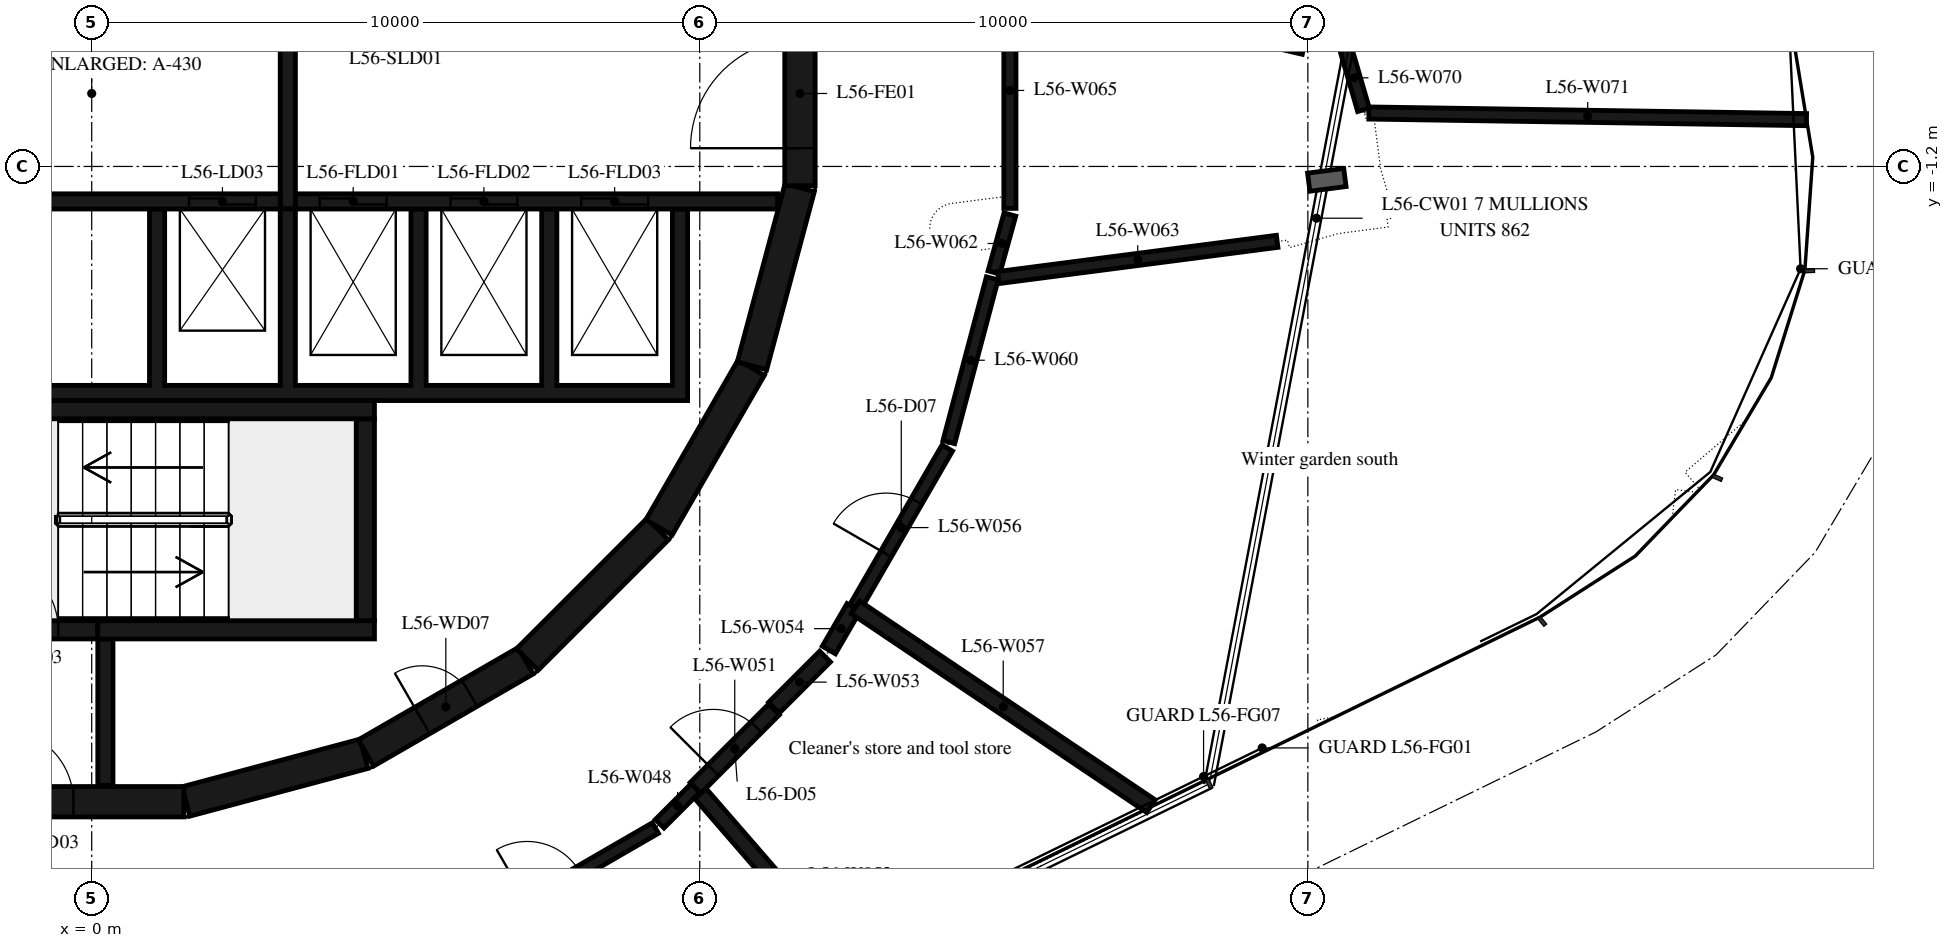
"""IFC4 building model, lengths in metres.
Left out: names, types, materials, properties, quantities, classifications, styles, units other than length and angle.
Written with IfcOpenShell. Run it as: python <this file> out.ifc"""

import sys

from ifc_helpers import new_model, si_unit, direction, frame, frame_2d, origin, place, context, subcontext, project, spatial, polyline, rectangle, outline, extrude, element, fill, save


model = new_model("IFC4")
c1 = context("Model", 3, precision=1e-05, world=origin(), true_north=direction((0.0, 1.0)))
c2 = subcontext(c1, "Body", "Model", "MODEL_VIEW")
j1 = project(units=[si_unit("LENGTHUNIT", "METRE"), si_unit("PLANEANGLEUNIT", "RADIAN")], contexts=[c1])
p1 = place(None, origin())
s1 = spatial("IfcSite", under=j1, at=p1, CompositionType="ELEMENT")
p2 = place(p1, origin())
s2 = spatial("IfcBuilding", under=s1, at=p2, CompositionType="ELEMENT")
p3 = place(p2, frame((0.0, 0.0, 219.9)))
s3 = spatial("IfcBuildingStorey", under=s2, at=p3, CompositionType="ELEMENT", Elevation=219.9)
p4 = place(p3, frame((1.55, -11.643, 0.0), z_axis=(0.0, 0.0, 1.0), x_axis=(0.965948410781, 0.258734743916, 0.0)))
e1 = element("IfcWall", 1, at=p4, inside=s3, PredefinedType="SHEAR", context=c2, shape_type="SweptSolid", body=[
    extrude(rectangle(XDim=3.033, YDim=0.5, at=frame_2d((1.516, 0.0))), origin(), (0.0, 0.0, 1.0), 6.35),
])
p5 = place(p3, frame((4.51, -10.845, 0.0), z_axis=(0.0, 0.0, 1.0), x_axis=(0.865975092491, 0.500087131594, 0.0)))
e2 = element("IfcWall", 2, at=p5, inside=s3, PredefinedType="SHEAR", context=c2, shape_type="SweptSolid", body=[
    extrude(rectangle(XDim=3.033, YDim=0.5, at=frame_2d((1.516, 0.0))), origin(), (0.0, 0.0, 1.0), 6.35),
])
p6 = place(p5, frame((1.066, 0.0, 0.0)))
e3 = element("IfcOpeningElement", 3, at=p6, cuts=e2, PredefinedType="OPENING", context=c2, shape_type="SweptSolid", body=[
    extrude(rectangle(XDim=0.9, YDim=2.1, at=frame_2d((0.45, 1.05))), frame((0.0, 0.26, 0.0), z_axis=(0.0, -1.0, 0.0), x_axis=(1.0, 0.0, 0.0)), (0.0, 0.0, 1.0), 0.52),
])
p7 = place(p3, frame((7.164, -9.308, 0.0), z_axis=(0.0, 0.0, 1.0), x_axis=(0.707106781187, 0.707106781187, 0.0)))
e4 = element("IfcWall", 4, at=p7, inside=s3, PredefinedType="SHEAR", context=c2, shape_type="SweptSolid", body=[
    extrude(rectangle(XDim=3.032, YDim=0.5, at=frame_2d((1.516, 0.0))), origin(), (0.0, 0.0, 1.0), 6.35),
])
for number, where, z_axis, x_axis in (
    (5, (9.329, -7.137, 0.0), (0.0, 0.0, 1.0), (0.5, 0.866, 0.0)),
    (6, (10.858, -4.479, 0.0), (0.0, 0.0, 1.0), (0.259, 0.966, 0.0)),
):
    element("IfcWall", number, at=place(p3, frame(where, z_axis=z_axis, x_axis=x_axis)), inside=s3, PredefinedType="SHEAR", context=c2, shape_type="SweptSolid", body=[
        extrude(rectangle(XDim=3.033, YDim=0.5, at=frame_2d((1.516, 0.0))), origin(), (0.0, 0.0, 1.0), 6.35),
    ])
p8 = place(p3, frame((11.647, -1.516, 0.0), z_axis=(0.0, 0.0, 1.0), x_axis=(0.0, 1.0, 0.0)))
e7 = element("IfcWall", 7, at=p8, inside=s3, PredefinedType="SHEAR", context=c2, shape_type="SweptSolid", body=[
    extrude(rectangle(XDim=3.033, YDim=0.5, at=frame_2d((1.516, 0.0))), origin(), (0.0, 0.0, 1.0), 6.35),
])
p9 = place(p8, frame((0.616, 0.0, 0.0)))
e8 = element("IfcOpeningElement", 8, at=p9, cuts=e7, PredefinedType="OPENING", context=c2, shape_type="SweptSolid", body=[
    extrude(rectangle(XDim=1.8, YDim=2.1, at=frame_2d((0.9, 1.05))), frame((0.0, 0.26, 0.0), z_axis=(0.0, -1.0, 0.0), x_axis=(1.0, 0.0, 0.0)), (0.0, 0.0, 1.0), 0.52),
])
p10 = place(p3, frame((-1.516, -11.647, 0.0), z_axis=(0.0, 0.0, 1.0), x_axis=(1.0, 0.0, 0.0)))
e9 = element("IfcWall", 9, at=p10, inside=s3, PredefinedType="SHEAR", context=c2, shape_type="SweptSolid", body=[
    extrude(rectangle(XDim=3.033, YDim=0.5, at=frame_2d((1.516, 0.0))), origin(), (0.0, 0.0, 1.0), 6.35),
])
p11 = place(p10, frame((0.016, 0.0, 0.0)))
e10 = element("IfcOpeningElement", 10, at=p11, cuts=e9, PredefinedType="OPENING", context=c2, shape_type="SweptSolid", body=[
    extrude(rectangle(XDim=1.2, YDim=2.1, at=frame_2d((0.6, 1.05))), frame((0.0, 0.26, 0.0), z_axis=(0.0, -1.0, 0.0), x_axis=(1.0, 0.0, 0.0)), (0.0, 0.0, 1.0), 0.52),
])
p12 = place(p3, frame((-2.4, -5.2, 0.0), z_axis=(0.0, 0.0, 1.0), x_axis=(1.0, 0.0, 0.0)))
e11 = element("IfcWall", 11, at=p12, inside=s3, PredefinedType="SHEAR", context=c2, shape_type="SweptSolid", body=[
    extrude(rectangle(XDim=7.05, YDim=0.3, at=frame_2d((3.525, 0.0))), origin(), (0.0, 0.0, 1.0), 6.35),
])
p13 = place(p3, frame((4.5, -8.67, 0.0), z_axis=(0.0, 0.0, 1.0), x_axis=(0.0, 1.0, 0.0)))
e12 = element("IfcWall", 12, at=p13, inside=s3, PredefinedType="SHEAR", context=c2, shape_type="SweptSolid", body=[
    extrude(rectangle(XDim=3.32, YDim=0.3, at=frame_2d((1.66, 0.0))), origin(), (0.0, 0.0, 1.0), 6.35),
])
p14 = place(p3, frame((0.1, -8.82, 0.0), z_axis=(0.0, 0.0, 1.0), x_axis=(1.0, 0.0, 0.0)))
e13 = element("IfcWall", 13, at=p14, inside=s3, PredefinedType="SHEAR", context=c2, shape_type="SweptSolid", body=[
    extrude(rectangle(XDim=4.55, YDim=0.3, at=frame_2d((2.275, 0.0))), origin(), (0.0, 0.0, 1.0), 6.35),
])
p15 = place(p3, frame((-2.4, -8.82, 0.0), z_axis=(0.0, 0.0, 1.0), x_axis=(1.0, 0.0, 0.0)))
e14 = element("IfcWall", 14, at=p15, inside=s3, PredefinedType="SHEAR", context=c2, shape_type="SweptSolid", body=[
    extrude(rectangle(XDim=2.5, YDim=0.3, at=frame_2d((1.25, 0.0))), origin(), (0.0, 0.0, 1.0), 6.35),
])
p16 = place(p15, frame((0.65, 0.0, 0.0)))
e15 = element("IfcOpeningElement", 15, at=p16, cuts=e14, PredefinedType="OPENING", context=c2, shape_type="SweptSolid", body=[
    extrude(rectangle(XDim=1.2, YDim=2.1, at=frame_2d((0.6, 1.05))), frame((0.0, 0.16, 0.0), z_axis=(0.0, -1.0, 0.0), x_axis=(1.0, 0.0, 0.0)), (0.0, 0.0, 1.0), 0.32),
])
p17 = place(p3, frame((0.225, -8.97, 0.0), z_axis=(0.0, 0.0, 1.0), x_axis=(0.0, -1.0, 0.0)))
e16 = element("IfcWall", 16, at=p17, inside=s3, PredefinedType="SHEAR", context=c2, shape_type="SweptSolid", body=[
    extrude(rectangle(XDim=2.41, YDim=0.25, at=frame_2d((1.205, 0.0))), origin(), (0.0, 0.0, 1.0), 6.35),
])
p18 = place(p3, origin())
e17 = element("IfcWall", 17, at=p18, inside=s3, PredefinedType="SHEAR", context=c2, shape_type="SweptSolid", body=[
    extrude(outline(polyline([(9.8, -5.05), (9.8, -4.8), (9.8, -1.9), (9.55, -1.9), (9.55, -4.8), (7.65, -4.8), (7.65, -1.9), (7.4, -1.9), (7.4, -4.8), (5.5, -4.8), (5.5, -1.9), (5.25, -1.9), (5.25, -4.8), (3.35, -4.8), (3.35, -1.9), (3.1, -1.9), (3.1, -4.8), (1.2, -4.8), (1.2, -1.9), (0.95, -1.9), (0.95, -4.8), (-5.25, -4.8), (-5.25, -1.9), (-5.5, -1.9), (-5.5, -4.8), (-7.4, -4.8), (-7.4, -1.9), (-7.65, -1.9), (-7.65, -4.8), (-9.55, -4.8), (-9.55, -1.9), (-9.8, -1.9), (-9.8, -4.8), (-9.8, -5.05), (9.8, -5.05)])), origin(), (0.0, 0.0, 1.0), 6.35),
])
p19 = place(p3, frame((-11.28, -1.775, 0.0), z_axis=(0.0, 0.0, 1.0), x_axis=(1.0, 0.0, 0.0)))
e18 = element("IfcWall", 18, at=p19, inside=s3, PredefinedType="SHEAR", context=c2, shape_type="SweptSolid", body=[
    extrude(rectangle(XDim=14.38, YDim=0.25, at=frame_2d((7.19, 0.0))), origin(), (0.0, 0.0, 1.0), 6.35),
])
p20 = place(p19, frame((12.88, 0.0, 0.0)))
e19 = element("IfcOpeningElement", 19, at=p20, cuts=e18, PredefinedType="OPENING", context=c2, shape_type="SweptSolid", body=[
    extrude(rectangle(XDim=1.1, YDim=2.1, at=frame_2d((0.55, 1.05))), frame((0.0, 0.135, 0.0), z_axis=(0.0, -1.0, 0.0), x_axis=(1.0, 0.0, 0.0)), (0.0, 0.0, 1.0), 0.27),
])
p21 = place(p19, frame((8.68, 0.0, 0.0)))
e20 = element("IfcOpeningElement", 20, at=p21, cuts=e18, PredefinedType="OPENING", context=c2, shape_type="SweptSolid", body=[
    extrude(rectangle(XDim=0.9, YDim=2.1, at=frame_2d((0.45, 1.05))), frame((0.0, 0.135, 0.0), z_axis=(0.0, -1.0, 0.0), x_axis=(1.0, 0.0, 0.0)), (0.0, 0.0, 1.0), 0.27),
])
p22 = place(p3, frame((3.35, -1.775, 0.0), z_axis=(0.0, 0.0, 1.0), x_axis=(1.0, 0.0, 0.0)))
e21 = element("IfcWall", 21, at=p22, inside=s3, PredefinedType="SHEAR", context=c2, shape_type="SweptSolid", body=[
    extrude(rectangle(XDim=7.93, YDim=0.25, at=frame_2d((3.965, 0.0))), origin(), (0.0, 0.0, 1.0), 6.35),
])
p23 = place(p22, frame((0.4, 0.0, 0.0)))
e22 = element("IfcOpeningElement", 22, at=p23, cuts=e21, PredefinedType="OPENING", context=c2, shape_type="SweptSolid", body=[
    extrude(rectangle(XDim=1.1, YDim=2.4, at=frame_2d((0.55, 1.2))), frame((0.0, 0.135, 0.0), z_axis=(0.0, -1.0, 0.0), x_axis=(1.0, 0.0, 0.0)), (0.0, 0.0, 1.0), 0.27),
])
p24 = place(p22, frame((2.55, 0.0, 0.0)))
e23 = element("IfcOpeningElement", 23, at=p24, cuts=e21, PredefinedType="OPENING", context=c2, shape_type="SweptSolid", body=[
    extrude(rectangle(XDim=1.1, YDim=2.4, at=frame_2d((0.55, 1.2))), frame((0.0, 0.135, 0.0), z_axis=(0.0, -1.0, 0.0), x_axis=(1.0, 0.0, 0.0)), (0.0, 0.0, 1.0), 0.27),
])
p25 = place(p22, frame((4.7, 0.0, 0.0)))
e24 = element("IfcOpeningElement", 24, at=p25, cuts=e21, PredefinedType="OPENING", context=c2, shape_type="SweptSolid", body=[
    extrude(rectangle(XDim=1.1, YDim=2.4, at=frame_2d((0.55, 1.2))), frame((0.0, 0.135, 0.0), z_axis=(0.0, -1.0, 0.0), x_axis=(1.0, 0.0, 0.0)), (0.0, 0.0, 1.0), 0.27),
])
p26 = place(p3, frame((3.225, -1.9, 0.0), z_axis=(0.0, 0.0, 1.0), x_axis=(0.0, 1.0, 0.0)))
e25 = element("IfcWall", 25, at=p26, inside=s3, PredefinedType="SHEAR", context=c2, shape_type="SweptSolid", body=[
    extrude(rectangle(XDim=3.8, YDim=0.25, at=frame_2d((1.9, 0.0))), origin(), (0.0, 0.0, 1.0), 6.35),
])
p27 = place(p3, frame((5.917, -14.02, 0.0), z_axis=(0.0, 0.0, 1.0), x_axis=(0.865601686425, 0.500733182901, 0.0)))
e26 = element("IfcWall", 26, at=p27, inside=s3, PredefinedType="PARTITIONING", context=c2, shape_type="SweptSolid", body=[
    extrude(rectangle(XDim=3.874, YDim=0.2, at=frame_2d((1.937, 0.0))), origin(), (0.0, 0.0, 1.0), 6.35),
])
p28 = place(p27, frame((1.437, 0.0, 0.0)))
e27 = element("IfcOpeningElement", 27, at=p28, cuts=e26, PredefinedType="OPENING", context=c2, shape_type="SweptSolid", body=[
    extrude(rectangle(XDim=1.0, YDim=2.1, at=frame_2d((0.5, 1.05))), frame((0.0, 0.11, 0.0), z_axis=(0.0, -1.0, 0.0), x_axis=(1.0, 0.0, 0.0)), (0.0, 0.0, 1.0), 0.22),
])
p29 = place(p3, frame((9.341, -12.009, 0.0), z_axis=(0.0, 0.0, 1.0), x_axis=(0.706960276109, 0.707253255916, 0.0)))
e28 = element("IfcWall", 28, at=p29, inside=s3, PredefinedType="PARTITIONING", context=c2, shape_type="SweptSolid", body=[
    extrude(rectangle(XDim=0.833, YDim=0.2, at=frame_2d((0.417, 0.0))), origin(), (0.0, 0.0, 1.0), 6.35),
])
p30 = place(p3, frame((9.93, -11.42, 0.0), z_axis=(0.0, 0.0, 1.0), x_axis=(0.707106781187, 0.707106781187, 0.0)))
e29 = element("IfcWall", 29, at=p30, inside=s3, PredefinedType="PARTITIONING", context=c2, shape_type="SweptSolid", body=[
    extrude(rectangle(XDim=1.824, YDim=0.25, at=frame_2d((0.912, 0.0))), origin(), (0.0, 0.0, 1.0), 6.35),
])
p31 = place(p30, frame((0.412, 0.0, 0.0)))
e30 = element("IfcOpeningElement", 30, at=p31, cuts=e29, PredefinedType="OPENING", context=c2, shape_type="SweptSolid", body=[
    extrude(rectangle(XDim=1.0, YDim=2.1, at=frame_2d((0.5, 1.05))), frame((0.0, 0.135, 0.0), z_axis=(0.0, -1.0, 0.0), x_axis=(1.0, 0.0, 0.0)), (0.0, 0.0, 1.0), 0.27),
])
p32 = place(p3, frame((10.012, -11.514, 0.0), z_axis=(0.0, 0.0, 1.0), x_axis=(0.655248263948, -0.755413603659, 0.0)))
e31 = element("IfcWall", 31, at=p32, inside=s3, PredefinedType="PARTITIONING", context=c2, shape_type="SweptSolid", body=[
    extrude(rectangle(XDim=3.568, YDim=0.25, at=frame_2d((1.784, 0.0))), origin(), (0.0, 0.0, 1.0), 6.35),
])
p33 = place(p3, frame((11.22, -10.1, 0.0), z_axis=(0.0, 0.0, 1.0), x_axis=(0.707106781187, 0.707106781187, 0.0)))
e32 = element("IfcWall", 32, at=p33, inside=s3, PredefinedType="PARTITIONING", context=c2, shape_type="SweptSolid", body=[
    extrude(rectangle(XDim=1.188, YDim=0.25, at=frame_2d((0.594, 0.0))), origin(), (0.0, 0.0, 1.0), 6.35),
])
p34 = place(p3, frame((12.123, -9.152, 0.0), z_axis=(0.0, 0.0, 1.0), x_axis=(0.501830648268, 0.864965895546, 0.0)))
e33 = element("IfcWall", 33, at=p34, inside=s3, PredefinedType="PARTITIONING", context=c2, shape_type="SweptSolid", body=[
    extrude(rectangle(XDim=0.812, YDim=0.25, at=frame_2d((0.406, 0.0))), origin(), (0.0, 0.0, 1.0), 6.35),
])
p35 = place(p3, frame((12.557, -8.447, 0.0), z_axis=(0.0, 0.0, 1.0), x_axis=(0.500412148236, 0.865787319091, 0.0)))
e34 = element("IfcWall", 34, at=p35, inside=s3, PredefinedType="PARTITIONING", context=c2, shape_type="SweptSolid", body=[
    extrude(rectangle(XDim=3.023, YDim=0.2, at=frame_2d((1.511, 0.0))), origin(), (0.0, 0.0, 1.0), 6.35),
])
p36 = place(p35, frame((1.011, 0.0, 0.0)))
e35 = element("IfcOpeningElement", 35, at=p36, cuts=e34, PredefinedType="OPENING", context=c2, shape_type="SweptSolid", body=[
    extrude(rectangle(XDim=1.0, YDim=2.1, at=frame_2d((0.5, 1.05))), frame((0.0, 0.11, 0.0), z_axis=(0.0, -1.0, 0.0), x_axis=(1.0, 0.0, 0.0)), (0.0, 0.0, 1.0), 0.22),
])
p37 = place(p3, frame((12.56, -8.45, 0.0), z_axis=(0.0, 0.0, 1.0), x_axis=(0.829670163867, -0.558253902081, 0.0)))
e36 = element("IfcWall", 36, at=p37, inside=s3, PredefinedType="PARTITIONING", context=c2, shape_type="SweptSolid", body=[
    extrude(rectangle(XDim=5.858, YDim=0.25, at=frame_2d((2.929, 0.0))), origin(), (0.0, 0.0, 1.0), 6.35),
])
p38 = place(p3, frame((14.096, -5.733, 0.0), z_axis=(0.0, 0.0, 1.0), x_axis=(0.256364537332, 0.966580169463, 0.0)))
e37 = element("IfcWall", 37, at=p38, inside=s3, PredefinedType="PARTITIONING", context=c2, shape_type="SweptSolid", body=[
    extrude(rectangle(XDim=2.786, YDim=0.2, at=frame_2d((1.393, 0.0))), origin(), (0.0, 0.0, 1.0), 6.35),
])
p39 = place(p3, frame((14.837, -2.944, 0.0), z_axis=(0.0, 0.0, 1.0), x_axis=(0.266269011442, 0.963898756896, 0.0)))
e38 = element("IfcWall", 38, at=p39, inside=s3, PredefinedType="PARTITIONING", context=c2, shape_type="SweptSolid", body=[
    extrude(rectangle(XDim=0.989, YDim=0.2, at=frame_2d((0.495, 0.0))), origin(), (0.0, 0.0, 1.0), 6.35),
])
p40 = place(p3, frame((14.909, -3.027, 0.0), z_axis=(0.0, 0.0, 1.0), x_axis=(0.991670322306, 0.128802064645, 0.0)))
e39 = element("IfcWall", 39, at=p40, inside=s3, PredefinedType="PARTITIONING", context=c2, shape_type="SweptSolid", body=[
    extrude(rectangle(XDim=4.625, YDim=0.2, at=frame_2d((2.312, 0.0))), origin(), (0.0, 0.0, 1.0), 6.35),
])
p41 = place(p3, frame((15.1, -1.89, 0.0), z_axis=(0.0, 0.0, 1.0), x_axis=(0.0, 1.0, 0.0)))
e40 = element("IfcWall", 40, at=p41, inside=s3, PredefinedType="PARTITIONING", context=c2, shape_type="SweptSolid", body=[
    extrude(rectangle(XDim=3.88, YDim=0.2, at=frame_2d((1.94, 0.0))), origin(), (0.0, 0.0, 1.0), 6.35),
])
p42 = place(p3, frame((20.915, -0.269, 0.0), z_axis=(0.0, 0.0, 1.0), x_axis=(-0.280153802847, 0.959955127467, 0.0)))
e41 = element("IfcWall", 41, at=p42, inside=s3, PredefinedType="PARTITIONING", context=c2, shape_type="SweptSolid", body=[
    extrude(rectangle(XDim=1.097, YDim=0.2, at=frame_2d((0.549, 0.0))), origin(), (0.0, 0.0, 1.0), 6.35),
])
p43 = place(p3, frame((21.004, -0.321, 0.0), z_axis=(0.0, 0.0, 1.0), x_axis=(0.999885546768, -0.01512922221, 0.0)))
e42 = element("IfcWall", 42, at=p43, inside=s3, PredefinedType="PARTITIONING", context=c2, shape_type="SweptSolid", body=[
    extrude(rectangle(XDim=7.197, YDim=0.2, at=frame_2d((3.599, 0.0))), origin(), (0.0, 0.0, 1.0), 6.35),
])
p44 = place(p16, origin())
e43 = element("IfcDoor", 43, at=p44, inside=s3, OperationType="SINGLE_SWING_LEFT", PredefinedType="DOOR", context=c2, shape_type="SweptSolid", body=[
    extrude(rectangle(XDim=1.2, YDim=2.1, at=frame_2d((0.6, 1.05))), frame((0.0, 0.025, 0.0), z_axis=(0.0, -1.0, 0.0), x_axis=(1.0, 0.0, 0.0)), (0.0, 0.0, 1.0), 0.05),
])
fill(e15, e43)
p45 = place(p11, origin())
e44 = element("IfcDoor", 44, at=p45, inside=s3, OperationType="SINGLE_SWING_RIGHT", PredefinedType="DOOR", context=c2, shape_type="SweptSolid", body=[
    extrude(rectangle(XDim=1.2, YDim=2.1, at=frame_2d((0.6, 1.05))), frame((0.0, 0.025, 0.0), z_axis=(0.0, -1.0, 0.0), x_axis=(1.0, 0.0, 0.0)), (0.0, 0.0, 1.0), 0.05),
])
fill(e10, e44)
p46 = place(p9, origin())
e45 = element("IfcDoor", 45, at=p46, inside=s3, OperationType="DOUBLE_DOOR_SINGLE_SWING", PredefinedType="DOOR", context=c2, shape_type="SweptSolid", body=[
    extrude(rectangle(XDim=1.8, YDim=2.1, at=frame_2d((0.9, 1.05))), frame((0.0, 0.025, 0.0), z_axis=(0.0, -1.0, 0.0), x_axis=(1.0, 0.0, 0.0)), (0.0, 0.0, 1.0), 0.05),
])
fill(e8, e45)
p47 = place(p20, origin())
e46 = element("IfcDoor", 46, at=p47, inside=s3, OperationType="DOUBLE_DOOR_SLIDING", PredefinedType="DOOR", context=c2, shape_type="SweptSolid", body=[
    extrude(rectangle(XDim=1.1, YDim=2.1, at=frame_2d((0.55, 1.05))), frame((0.0, 0.025, 0.0), z_axis=(0.0, -1.0, 0.0), x_axis=(1.0, 0.0, 0.0)), (0.0, 0.0, 1.0), 0.05),
])
fill(e19, e46)
p48 = place(p23, origin())
e47 = element("IfcDoor", 47, at=p48, inside=s3, OperationType="DOUBLE_DOOR_SLIDING", PredefinedType="DOOR", context=c2, shape_type="SweptSolid", body=[
    extrude(rectangle(XDim=1.1, YDim=2.4, at=frame_2d((0.55, 1.2))), frame((0.0, 0.025, 0.0), z_axis=(0.0, -1.0, 0.0), x_axis=(1.0, 0.0, 0.0)), (0.0, 0.0, 1.0), 0.05),
])
fill(e22, e47)
p49 = place(p24, origin())
e48 = element("IfcDoor", 48, at=p49, inside=s3, OperationType="DOUBLE_DOOR_SLIDING", PredefinedType="DOOR", context=c2, shape_type="SweptSolid", body=[
    extrude(rectangle(XDim=1.1, YDim=2.4, at=frame_2d((0.55, 1.2))), frame((0.0, 0.025, 0.0), z_axis=(0.0, -1.0, 0.0), x_axis=(1.0, 0.0, 0.0)), (0.0, 0.0, 1.0), 0.05),
])
fill(e23, e48)
p50 = place(p25, origin())
e49 = element("IfcDoor", 49, at=p50, inside=s3, OperationType="DOUBLE_DOOR_SLIDING", PredefinedType="DOOR", context=c2, shape_type="SweptSolid", body=[
    extrude(rectangle(XDim=1.1, YDim=2.4, at=frame_2d((0.55, 1.2))), frame((0.0, 0.025, 0.0), z_axis=(0.0, -1.0, 0.0), x_axis=(1.0, 0.0, 0.0)), (0.0, 0.0, 1.0), 0.05),
])
fill(e24, e49)
p51 = place(p6, origin())
e50 = element("IfcDoor", 50, at=p51, inside=s3, OperationType="SINGLE_SWING_LEFT", PredefinedType="DOOR", context=c2, shape_type="SweptSolid", body=[
    extrude(rectangle(XDim=0.9, YDim=2.1, at=frame_2d((0.45, 1.05))), frame((0.0, 0.025, 0.0), z_axis=(0.0, -1.0, 0.0), x_axis=(1.0, 0.0, 0.0)), (0.0, 0.0, 1.0), 0.05),
])
fill(e3, e50)
p52 = place(p31, origin())
e51 = element("IfcDoor", 51, at=p52, inside=s3, OperationType="SINGLE_SWING_LEFT", PredefinedType="DOOR", context=c2, shape_type="SweptSolid", body=[
    extrude(rectangle(XDim=1.0, YDim=2.1, at=frame_2d((0.5, 1.05))), frame((0.0, 0.025, 0.0), z_axis=(0.0, -1.0, 0.0), x_axis=(1.0, 0.0, 0.0)), (0.0, 0.0, 1.0), 0.05),
])
fill(e30, e51)
p53 = place(p36, origin())
e52 = element("IfcDoor", 52, at=p53, inside=s3, OperationType="SINGLE_SWING_LEFT", PredefinedType="DOOR", context=c2, shape_type="SweptSolid", body=[
    extrude(rectangle(XDim=1.0, YDim=2.1, at=frame_2d((0.5, 1.05))), frame((0.0, 0.025, 0.0), z_axis=(0.0, -1.0, 0.0), x_axis=(1.0, 0.0, 0.0)), (0.0, 0.0, 1.0), 0.05),
])
fill(e35, e52)
save(model, sys.argv[1])
